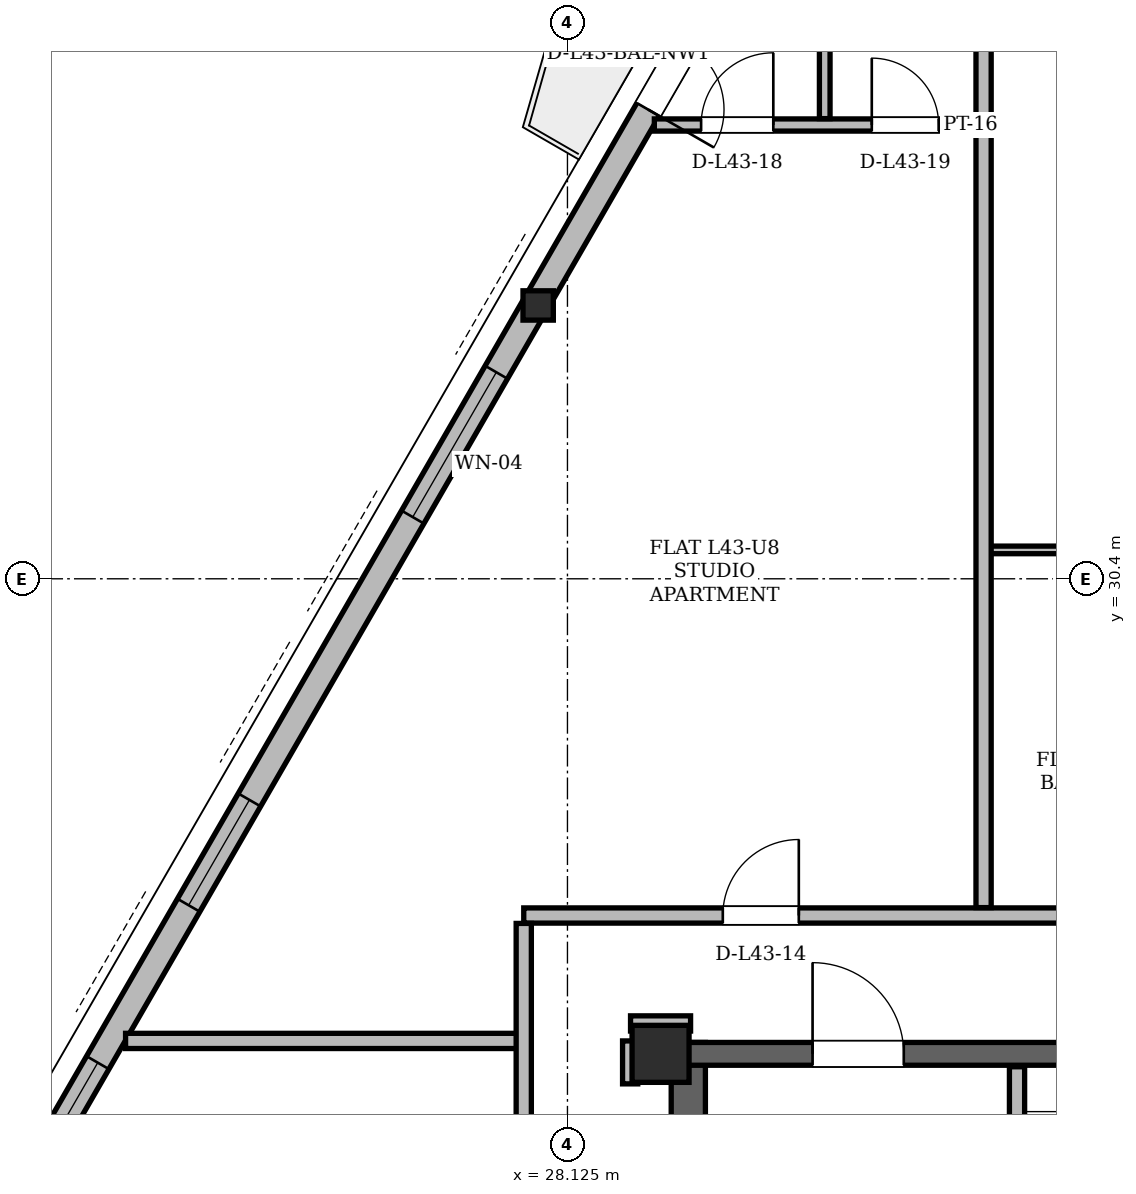
"""IFC4 building model, lengths in metres.
Left out: names, types, materials, properties, quantities, classifications, styles, units other than length and angle.
Written with IfcOpenShell. Run it as: python <this file> out.ifc"""

import sys

from ifc_helpers import new_model, si_unit, direction, frame, frame_2d, origin, origin_2d, place, context, subcontext, project, spatial, rectangle, hollow_rectangle, i_section, extrude, element, fill, save


model = new_model("IFC4")
c1 = context("Model", 3, precision=1e-05, world=origin(), true_north=direction((0.0, 1.0)))
c2 = subcontext(c1, "Body", "Model", "MODEL_VIEW")
j1 = project(units=[si_unit("LENGTHUNIT", "METRE"), si_unit("PLANEANGLEUNIT", "RADIAN")], contexts=[c1])
p1 = place(None, origin())
s1 = spatial("IfcSite", under=j1, at=p1, CompositionType="ELEMENT")
p2 = place(p1, origin())
s2 = spatial("IfcBuilding", under=s1, at=p2, CompositionType="ELEMENT")
p3 = place(p2, frame((0.0, 0.0, 163.8)))
s3 = spatial("IfcBuildingStorey", under=s2, at=p3, CompositionType="ELEMENT", Elevation=163.8)
p4 = place(p3, frame((29.35, 24.15, 0.0), z_axis=(0.0, 0.0, 1.0), x_axis=(1.0, 0.0, 0.0)))
e1 = element("IfcColumn", 1, at=p4, inside=s3, PredefinedType="COLUMN", context=c2, shape_type="SweptSolid", body=[
    extrude(hollow_rectangle(XDim=0.75, YDim=0.75, WallThickness=0.06, at=origin_2d()), origin(), (0.0, 0.0, 1.0), 3.6),
])
p5 = place(p3, frame((27.704, 34.009, 0.004), z_axis=(0.019779412159, -0.007272842272, 0.999777915649), x_axis=(0.345107427602, 0.938563190954, 0.0)))
e2 = element("IfcColumn", 2, at=p5, inside=s3, PredefinedType="COLUMN", context=c2, shape_type="SweptSolid", body=[
    extrude(i_section(OverallWidth=0.399, OverallDepth=0.386, WebThickness=0.021, FlangeThickness=0.033, at=origin_2d()), origin(), (0.0, 0.0, 1.0), 3.592),
])
p6 = place(p3, frame((29.715, 11.0, 0.0), z_axis=(0.0, 0.0, 1.0), x_axis=(0.0, 1.0, 0.0)))
e3 = element("IfcWall", 3, at=p6, inside=s3, PredefinedType="SHEAR", context=c2, shape_type="SweptSolid", body=[
    extrude(rectangle(XDim=13.3, YDim=0.45, at=frame_2d((6.65, 0.0))), origin(), (0.0, 0.0, 1.0), 3.38),
])
p7 = place(p3, frame((29.65, 24.15, 0.0), z_axis=(0.0, 0.0, 1.0), x_axis=(1.0, 0.0, 0.0)))
e4 = element("IfcWall", 4, at=p7, inside=s3, PredefinedType="SHEAR", context=c2, shape_type="SweptSolid", body=[
    extrude(rectangle(XDim=15.7, YDim=0.3, at=frame_2d((7.85, 0.0))), origin(), (0.0, 0.0, 1.0), 3.38),
])
p8 = place(p7, frame((1.7, 0.0, 0.0)))
e5 = element("IfcOpeningElement", 5, at=p8, cuts=e4, PredefinedType="OPENING", context=c2, shape_type="SweptSolid", body=[
    extrude(rectangle(XDim=1.2, YDim=2.2, at=frame_2d((0.6, 1.1))), frame((0.0, 0.15, 0.0), z_axis=(0.0, -1.0, 0.0), x_axis=(1.0, 0.0, 0.0)), (0.0, 0.0, 1.0), 0.3),
])
p9 = place(p7, frame((12.8, 0.0, 0.0)))
e6 = element("IfcOpeningElement", 6, at=p9, cuts=e4, PredefinedType="OPENING", context=c2, shape_type="SweptSolid", body=[
    extrude(rectangle(XDim=1.2, YDim=2.2, at=frame_2d((0.6, 1.1))), frame((0.0, 0.15, 0.0), z_axis=(0.0, -1.0, 0.0), x_axis=(1.0, 0.0, 0.0)), (0.0, 0.0, 1.0), 0.3),
])
p10 = place(p7, frame((6.55, 0.0, 0.0)))
e7 = element("IfcOpeningElement", 7, at=p10, cuts=e4, PredefinedType="OPENING", context=c2, shape_type="SweptSolid", body=[
    extrude(rectangle(XDim=0.9, YDim=2.05, at=frame_2d((0.45, 1.025))), frame((0.0, 0.15, 0.0), z_axis=(0.0, -1.0, 0.0), x_axis=(1.0, 0.0, 0.0)), (0.0, 0.0, 1.0), 0.3),
])
p11 = place(p7, frame((8.45, 0.0, 0.0)))
e8 = element("IfcOpeningElement", 8, at=p11, cuts=e4, PredefinedType="OPENING", context=c2, shape_type="SweptSolid", body=[
    extrude(rectangle(XDim=0.9, YDim=2.05, at=frame_2d((0.45, 1.025))), frame((0.0, 0.15, 0.0), z_axis=(0.0, -1.0, 0.0), x_axis=(1.0, 0.0, 0.0)), (0.0, 0.0, 1.0), 0.3),
])
p12 = place(p3, frame((33.065, 43.294, 0.0), z_axis=(0.0, 0.0, 1.0), x_axis=(-0.499998611639, -0.866026205354, 0.0)))
e9 = element("IfcWall", 9, at=p12, inside=s3, PredefinedType="SOLIDWALL", context=c2, shape_type="SweptSolid", body=[
    extrude(rectangle(XDim=35.738, YDim=0.34, at=frame_2d((17.869, 0.0))), origin(), (0.0, 0.0, 1.0), 2.6),
])
p13 = place(p12, frame((6.76, 0.0, 0.0)))
e10 = element("IfcOpeningElement", 10, at=p13, cuts=e9, PredefinedType="OPENING", context=c2, shape_type="SweptSolid", body=[
    extrude(rectangle(XDim=1.0, YDim=2.18, at=frame_2d((0.5, 1.09))), frame((0.0, 0.17, 0.0), z_axis=(0.0, -1.0, 0.0), x_axis=(1.0, 0.0, 0.0)), (0.0, 0.0, 1.0), 0.34),
])
p14 = place(p12, frame((26.624, 0.0, 0.0)))
e11 = element("IfcOpeningElement", 11, at=p14, cuts=e9, PredefinedType="OPENING", context=c2, shape_type="SweptSolid", body=[
    extrude(rectangle(XDim=1.5, YDim=2.2, at=frame_2d((0.75, 1.1))), frame((0.0, 0.17, 0.0), z_axis=(0.0, -1.0, 0.0), x_axis=(1.0, 0.0, 0.0)), (0.0, 0.0, 1.0), 0.34),
])
p15 = place(p12, frame((33.648, 0.0, 0.85)))
e12 = element("IfcOpeningElement", 12, at=p15, cuts=e9, PredefinedType="OPENING", context=c2, shape_type="SweptSolid", body=[
    extrude(rectangle(XDim=1.2, YDim=1.48, at=frame_2d((0.6, 0.74))), frame((0.0, 0.17, 0.0), z_axis=(0.0, -1.0, 0.0), x_axis=(1.0, 0.0, 0.0)), (0.0, 0.0, 1.0), 0.34),
])
p16 = place(p12, frame((22.24, 0.0, 0.85)))
e13 = element("IfcOpeningElement", 13, at=p16, cuts=e9, PredefinedType="OPENING", context=c2, shape_type="SweptSolid", body=[
    extrude(rectangle(XDim=1.2, YDim=1.48, at=frame_2d((0.6, 0.74))), frame((0.0, 0.17, 0.0), z_axis=(0.0, -1.0, 0.0), x_axis=(1.0, 0.0, 0.0)), (0.0, 0.0, 1.0), 0.34),
])
p17 = place(p12, frame((11.751, 0.0, 0.85)))
e14 = element("IfcOpeningElement", 14, at=p17, cuts=e9, PredefinedType="OPENING", context=c2, shape_type="SweptSolid", body=[
    extrude(rectangle(XDim=2.2, YDim=1.64, at=frame_2d((1.1, 0.82))), frame((0.0, 0.17, 0.0), z_axis=(0.0, -1.0, 0.0), x_axis=(1.0, 0.0, 0.0)), (0.0, 0.0, 1.0), 0.34),
])
p18 = place(p12, frame((18.248, 0.0, 0.85)))
e15 = element("IfcOpeningElement", 15, at=p18, cuts=e9, PredefinedType="OPENING", context=c2, shape_type="SweptSolid", body=[
    extrude(rectangle(XDim=1.6, YDim=1.64, at=frame_2d((0.8, 0.82))), frame((0.0, 0.17, 0.0), z_axis=(0.0, -1.0, 0.0), x_axis=(1.0, 0.0, 0.0)), (0.0, 0.0, 1.0), 0.34),
])
p19 = place(p12, frame((1.139, 0.0, 0.85)))
e16 = element("IfcOpeningElement", 16, at=p19, cuts=e9, PredefinedType="OPENING", context=c2, shape_type="SweptSolid", body=[
    extrude(rectangle(XDim=1.8, YDim=1.64, at=frame_2d((0.9, 0.82))), frame((0.0, 0.17, 0.0), z_axis=(0.0, -1.0, 0.0), x_axis=(1.0, 0.0, 0.0)), (0.0, 0.0, 1.0), 0.34),
])
p20 = place(p12, frame((30.5, 0.0, 0.85)))
e17 = element("IfcOpeningElement", 17, at=p20, cuts=e9, PredefinedType="OPENING", context=c2, shape_type="SweptSolid", body=[
    extrude(rectangle(XDim=1.2, YDim=1.48, at=frame_2d((0.6, 0.74))), frame((0.0, 0.17, 0.0), z_axis=(0.0, -1.0, 0.0), x_axis=(1.0, 0.0, 0.0)), (0.0, 0.0, 1.0), 0.34),
])
p21 = place(p3, frame((34.04, 19.48, 0.0), z_axis=(0.0, 0.0, 1.0), x_axis=(0.0, 1.0, 0.0)))
e18 = element("IfcWall", 18, at=p21, inside=s3, PredefinedType="PARTITIONING", context=c2, shape_type="SweptSolid", body=[
    extrude(rectangle(XDim=4.5, YDim=0.2, at=frame_2d((2.25, 0.0))), origin(), (0.0, 0.0, 1.0), 2.42),
])
p22 = place(p21, frame((2.12, 0.0, 0.0)))
e19 = element("IfcOpeningElement", 19, at=p22, cuts=e18, PredefinedType="OPENING", context=c2, shape_type="SweptSolid", body=[
    extrude(rectangle(XDim=1.1, YDim=2.2, at=frame_2d((0.55, 1.1))), frame((0.0, 0.1, 0.0), z_axis=(0.0, -1.0, 0.0), x_axis=(1.0, 0.0, 0.0)), (0.0, 0.0, 1.0), 0.2),
])
p23 = place(p3, frame((22.311, 24.32, 0.0), z_axis=(0.0, 0.0, 1.0), x_axis=(1.0, 0.0, 0.0)))
e20 = element("IfcWall", 20, at=p23, inside=s3, PredefinedType="PARTITIONING", context=c2, shape_type="SweptSolid", body=[
    extrude(rectangle(XDim=5.239, YDim=0.2, at=frame_2d((2.62, 0.0))), origin(), (0.0, 0.0, 1.0), 3.38),
])
p24 = place(p3, frame((28.955, 24.55, 0.0), z_axis=(0.0, 0.0, 1.0), x_axis=(1.0, 0.0, 0.0)))
e21 = element("IfcWall", 21, at=p24, inside=s3, PredefinedType="PARTITIONING", context=c2, shape_type="SweptSolid", body=[
    extrude(rectangle(XDim=0.79, YDim=0.2, at=frame_2d((0.395, 0.0))), origin(), (0.0, 0.0, 1.0), 2.842),
])
p25 = place(p3, frame((27.55, 25.97, 0.0), z_axis=(0.0, 0.0, 1.0), x_axis=(1.0, 0.0, 0.0)))
e22 = element("IfcWall", 22, at=p25, inside=s3, PredefinedType="PARTITIONING", context=c2, shape_type="SweptSolid", body=[
    extrude(rectangle(XDim=9.15, YDim=0.2, at=frame_2d((4.575, 0.0))), origin(), (0.0, 0.0, 1.0), 2.842),
])
p26 = place(p25, frame((2.619, 0.0, 0.0)))
e23 = element("IfcOpeningElement", 23, at=p26, cuts=e22, PredefinedType="OPENING", context=c2, shape_type="SweptSolid", body=[
    extrude(rectangle(XDim=1.0, YDim=2.18, at=frame_2d((0.5, 1.09))), frame((0.0, 0.1, 0.0), z_axis=(0.0, -1.0, 0.0), x_axis=(1.0, 0.0, 0.0)), (0.0, 0.0, 1.0), 0.2),
])
p27 = place(p3, frame((33.518, 30.78, 0.0), z_axis=(0.0, 0.0, 1.0), x_axis=(1.0, 0.0, 0.0)))
e24 = element("IfcWall", 24, at=p27, inside=s3, PredefinedType="PARTITIONING", context=c2, shape_type="SweptSolid", body=[
    extrude(rectangle(XDim=3.264, YDim=0.1, at=frame_2d((1.632, 0.0))), origin(), (0.0, 0.0, 1.0), 3.38),
])
p28 = place(p27, frame((1.192, 0.0, 0.0)))
e25 = element("IfcOpeningElement", 25, at=p28, cuts=e24, PredefinedType="OPENING", context=c2, shape_type="SweptSolid", body=[
    extrude(rectangle(XDim=0.88, YDim=2.08, at=frame_2d((0.44, 1.04))), frame((0.0, 0.05, 0.0), z_axis=(0.0, -1.0, 0.0), x_axis=(1.0, 0.0, 0.0)), (0.0, 0.0, 1.0), 0.1),
])
p29 = place(p3, frame((29.268, 36.37, 0.0), z_axis=(0.0, 0.0, 1.0), x_axis=(1.0, 0.0, 0.0)))
e26 = element("IfcWall", 26, at=p29, inside=s3, PredefinedType="PARTITIONING", context=c2, shape_type="SweptSolid", body=[
    extrude(rectangle(XDim=4.382, YDim=0.16, at=frame_2d((2.191, 0.0))), origin(), (0.0, 0.0, 1.0), 2.842),
])
p30 = place(p29, frame((0.615, 0.0, 0.0)))
e27 = element("IfcOpeningElement", 27, at=p30, cuts=e26, PredefinedType="OPENING", context=c2, shape_type="SweptSolid", body=[
    extrude(rectangle(XDim=0.95, YDim=2.1, at=frame_2d((0.475, 1.05))), frame((0.0, 0.08, 0.0), z_axis=(0.0, -1.0, 0.0), x_axis=(1.0, 0.0, 0.0)), (0.0, 0.0, 1.0), 0.16),
])
p31 = place(p29, frame((2.861, 0.0, 0.0)))
e28 = element("IfcOpeningElement", 28, at=p31, cuts=e26, PredefinedType="OPENING", context=c2, shape_type="SweptSolid", body=[
    extrude(rectangle(XDim=0.88, YDim=2.08, at=frame_2d((0.44, 1.04))), frame((0.0, 0.08, 0.0), z_axis=(0.0, -1.0, 0.0), x_axis=(1.0, 0.0, 0.0)), (0.0, 0.0, 1.0), 0.16),
])
p32 = place(p3, frame((27.55, 18.554, 0.0), z_axis=(0.0, 0.0, 1.0), x_axis=(0.0, 1.0, 0.0)))
e29 = element("IfcWall", 29, at=p32, inside=s3, PredefinedType="PARTITIONING", context=c2, shape_type="SweptSolid", body=[
    extrude(rectangle(XDim=7.312, YDim=0.2, at=frame_2d((3.656, 0.0))), origin(), (0.0, 0.0, 1.0), 3.38),
])
p33 = place(p3, frame((28.95, 23.755, 0.0), z_axis=(0.0, 0.0, 1.0), x_axis=(0.0, 1.0, 0.0)))
e30 = element("IfcWall", 30, at=p33, inside=s3, PredefinedType="PARTITIONING", context=c2, shape_type="SweptSolid", body=[
    extrude(rectangle(XDim=0.565, YDim=0.2, at=frame_2d((0.283, 0.0))), origin(), (0.0, 0.0, 1.0), 3.38),
])
p34 = place(p3, frame((31.51, 36.454, 0.0), z_axis=(0.0, 0.0, 1.0), x_axis=(0.0, 1.0, 0.0)))
e31 = element("IfcWall", 31, at=p34, inside=s3, PredefinedType="PARTITIONING", context=c2, shape_type="SweptSolid", body=[
    extrude(rectangle(XDim=3.799, YDim=0.14, at=frame_2d((1.899, 0.0))), origin(), (0.0, 0.0, 1.0), 3.38),
])
p35 = place(p3, frame((33.6, 26.074, 0.0), z_axis=(0.0, 0.0, 1.0), x_axis=(0.0, 1.0, 0.0)))
e32 = element("IfcWall", 32, at=p35, inside=s3, PredefinedType="PARTITIONING", context=c2, shape_type="SweptSolid", body=[
    extrude(rectangle(XDim=17.046, YDim=0.2, at=frame_2d((8.523, 0.0))), origin(), (0.0, 0.0, 1.0), 3.38),
])
p36 = place(p13, origin())
e33 = element("IfcDoor", 33, at=p36, inside=s3, OperationType="SINGLE_SWING_RIGHT", PredefinedType="DOOR", context=c2, shape_type="SweptSolid", body=[
    extrude(rectangle(XDim=1.0, YDim=2.18, at=frame_2d((0.5, 1.09))), frame((0.0, 0.025, 0.0), z_axis=(0.0, -1.0, 0.0), x_axis=(1.0, 0.0, 0.0)), (0.0, 0.0, 1.0), 0.05),
])
fill(e10, e33)
p37 = place(p16, origin())
e34 = element("IfcWindow", 34, at=p37, inside=s3, PartitioningType="SINGLE_PANEL", PredefinedType="WINDOW", context=c2, shape_type="SweptSolid", body=[
    extrude(rectangle(XDim=1.2, YDim=1.48, at=frame_2d((0.6, 0.74))), frame((0.0, 0.03, 0.0), z_axis=(0.0, -1.0, 0.0), x_axis=(1.0, 0.0, 0.0)), (0.0, 0.0, 1.0), 0.06),
])
fill(e13, e34)
p38 = place(p17, origin())
e35 = element("IfcWindow", 35, at=p38, inside=s3, PartitioningType="SINGLE_PANEL", PredefinedType="WINDOW", context=c2, shape_type="SweptSolid", body=[
    extrude(rectangle(XDim=2.2, YDim=1.64, at=frame_2d((1.1, 0.82))), frame((0.0, 0.03, 0.0), z_axis=(0.0, -1.0, 0.0), x_axis=(1.0, 0.0, 0.0)), (0.0, 0.0, 1.0), 0.06),
])
fill(e14, e35)
p39 = place(p18, origin())
e36 = element("IfcWindow", 36, at=p39, inside=s3, PartitioningType="SINGLE_PANEL", PredefinedType="WINDOW", context=c2, shape_type="SweptSolid", body=[
    extrude(rectangle(XDim=1.6, YDim=1.64, at=frame_2d((0.8, 0.82))), frame((0.0, 0.03, 0.0), z_axis=(0.0, -1.0, 0.0), x_axis=(1.0, 0.0, 0.0)), (0.0, 0.0, 1.0), 0.06),
])
fill(e15, e36)
p40 = place(p8, origin())
e37 = element("IfcDoor", 37, at=p40, inside=s3, OperationType="SINGLE_SWING_LEFT", PredefinedType="DOOR", context=c2, shape_type="SweptSolid", body=[
    extrude(rectangle(XDim=1.2, YDim=2.2, at=frame_2d((0.6, 1.1))), frame((0.0, 0.025, 0.0), z_axis=(0.0, -1.0, 0.0), x_axis=(1.0, 0.0, 0.0)), (0.0, 0.0, 1.0), 0.05),
])
fill(e5, e37)
p41 = place(p26, origin())
e38 = element("IfcDoor", 38, at=p41, inside=s3, OperationType="SINGLE_SWING_RIGHT", PredefinedType="DOOR", context=c2, shape_type="SweptSolid", body=[
    extrude(rectangle(XDim=1.0, YDim=2.18, at=frame_2d((0.5, 1.09))), frame((0.0, 0.025, 0.0), z_axis=(0.0, -1.0, 0.0), x_axis=(1.0, 0.0, 0.0)), (0.0, 0.0, 1.0), 0.05),
])
fill(e23, e38)
p42 = place(p30, origin())
e39 = element("IfcDoor", 39, at=p42, inside=s3, OperationType="SINGLE_SWING_RIGHT", PredefinedType="DOOR", context=c2, shape_type="SweptSolid", body=[
    extrude(rectangle(XDim=0.95, YDim=2.1, at=frame_2d((0.475, 1.05))), frame((0.0, 0.025, 0.0), z_axis=(0.0, -1.0, 0.0), x_axis=(1.0, 0.0, 0.0)), (0.0, 0.0, 1.0), 0.05),
])
fill(e27, e39)
p43 = place(p31, origin())
e40 = element("IfcDoor", 40, at=p43, inside=s3, OperationType="SINGLE_SWING_LEFT", PredefinedType="DOOR", context=c2, shape_type="SweptSolid", body=[
    extrude(rectangle(XDim=0.88, YDim=2.08, at=frame_2d((0.44, 1.04))), frame((0.0, 0.025, 0.0), z_axis=(0.0, -1.0, 0.0), x_axis=(1.0, 0.0, 0.0)), (0.0, 0.0, 1.0), 0.05),
])
fill(e28, e40)
save(model, sys.argv[1])
